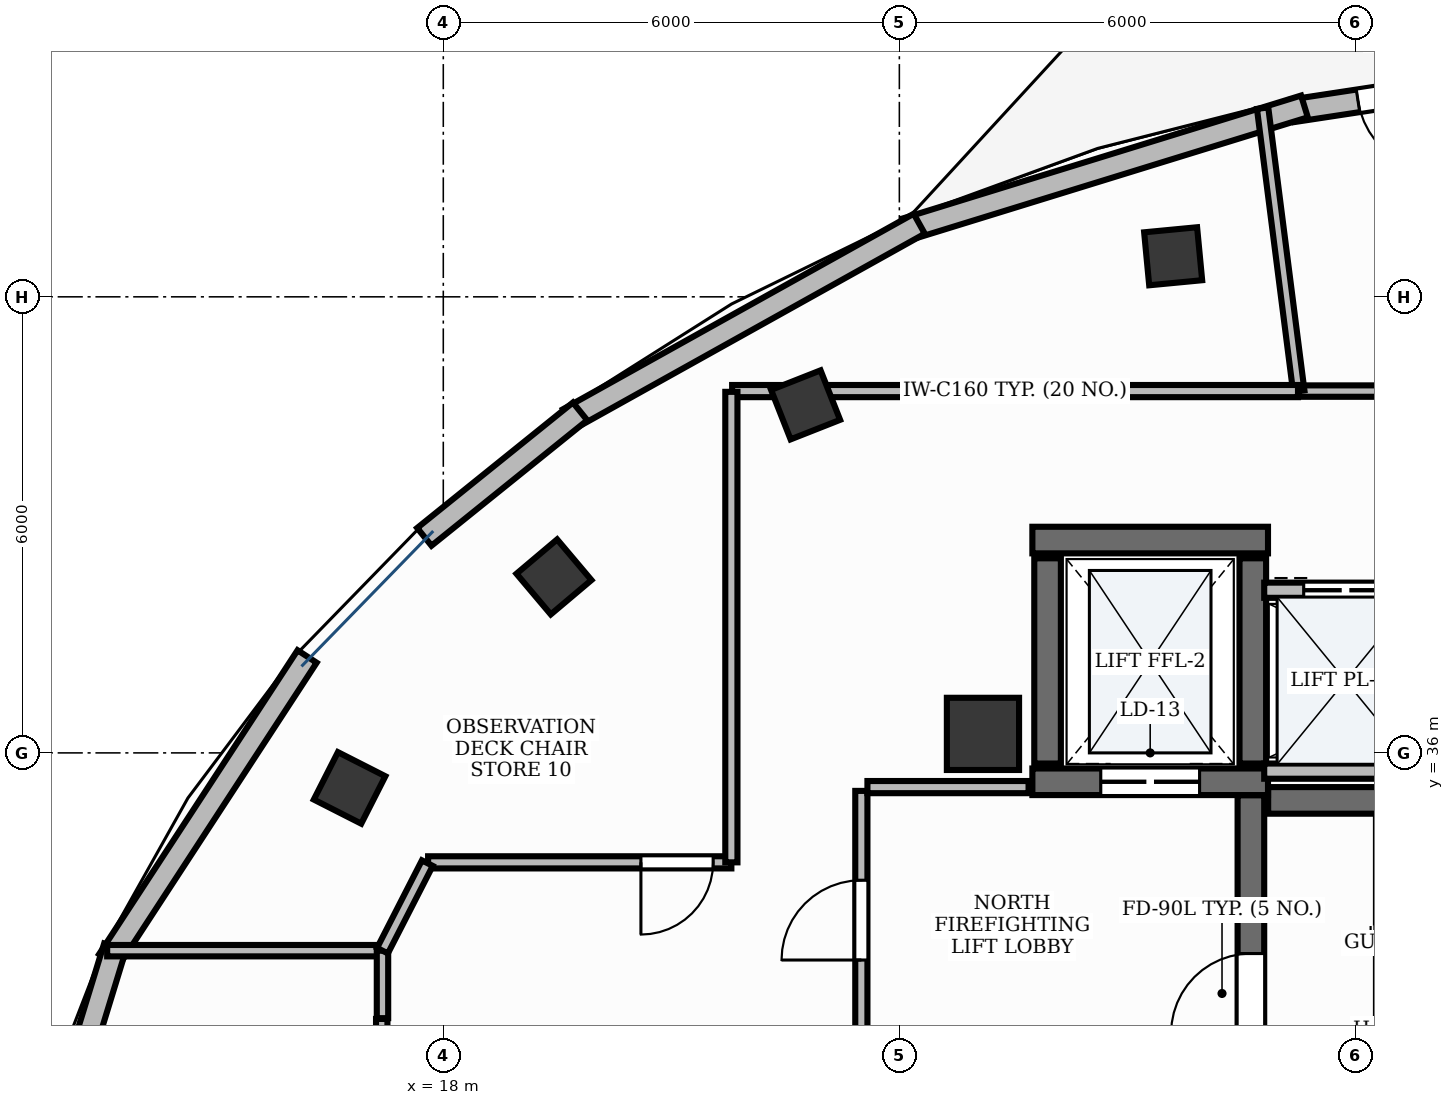
"""IFC4 building model, lengths in metres.
Left out: names, types, materials, properties, quantities, classifications, styles, units other than length and angle.
Written with IfcOpenShell. Run it as: python <this file> out.ifc"""

import sys

from ifc_helpers import new_model, si_unit, direction, frame, frame_2d, origin, origin_2d, place, context, subcontext, project, spatial, rectangle, extrude, element, fill, save


model = new_model("IFC4")
c1 = context("Model", 3, precision=1e-05, world=origin(), true_north=direction((0.0, 1.0)))
c2 = subcontext(c1, "Body", "Model", "MODEL_VIEW")
j1 = project(units=[si_unit("LENGTHUNIT", "METRE"), si_unit("PLANEANGLEUNIT", "RADIAN")], contexts=[c1])
p1 = place(None, origin())
s1 = spatial("IfcSite", under=j1, at=p1, CompositionType="ELEMENT")
p2 = place(p1, origin())
s2 = spatial("IfcBuilding", under=s1, at=p2, CompositionType="ELEMENT")
p3 = place(p2, frame((0.0, 0.0, 314.4)))
s3 = spatial("IfcBuildingStorey", under=s2, at=p3, CompositionType="ELEMENT", Elevation=314.4)
p4 = place(p3, frame((28.852, 35.375, 0.0), z_axis=(0.0, 0.0, 1.0), x_axis=(1.0, 0.0, 0.0)))
e1 = element("IfcWall", 1, at=p4, inside=s3, PredefinedType="SHEAR", context=c2, shape_type="SweptSolid", body=[
    extrude(rectangle(XDim=8.148, YDim=0.35, at=frame_2d((4.074, 0.0))), origin(), (0.0, 0.0, 1.0), 3.9),
])
p5 = place(p3, frame((28.625, 32.11, 0.0), z_axis=(0.0, 0.0, 1.0), x_axis=(0.0, 1.0, 0.0)))
e2 = element("IfcWall", 2, at=p5, inside=s3, PredefinedType="SHEAR", context=c2, shape_type="SweptSolid", body=[
    extrude(rectangle(XDim=3.333, YDim=0.35, at=frame_2d((1.667, 0.0))), origin(), (0.0, 0.0, 1.0), 3.9),
])
p6 = place(p5, frame((0.2, 0.0, 0.0)))
e3 = element("IfcOpeningElement", 3, at=p6, cuts=e2, PredefinedType="OPENING", context=c2, shape_type="SweptSolid", body=[
    extrude(rectangle(XDim=1.05, YDim=2.15, at=frame_2d((0.525, 1.075))), frame((0.0, 0.19, 0.0), z_axis=(0.0, -1.0, 0.0), x_axis=(1.0, 0.0, 0.0)), (0.0, 0.0, 1.0), 0.38),
])
p7 = place(p3, frame((25.75, 38.8, 0.0), z_axis=(0.0, 0.0, 1.0), x_axis=(1.0, 0.0, 0.0)))
e4 = element("IfcWall", 4, at=p7, inside=s3, PredefinedType="SHEAR", context=c2, shape_type="SweptSolid", body=[
    extrude(rectangle(XDim=3.1, YDim=0.35, at=frame_2d((1.55, 0.0))), origin(), (0.0, 0.0, 1.0), 3.9),
])
p8 = place(p3, frame((25.75, 35.62, 0.0), z_axis=(0.0, 0.0, 1.0), x_axis=(1.0, 0.0, 0.0)))
e5 = element("IfcWall", 5, at=p8, inside=s3, PredefinedType="SHEAR", context=c2, shape_type="SweptSolid", body=[
    extrude(rectangle(XDim=3.1, YDim=0.35, at=frame_2d((1.55, 0.0))), origin(), (0.0, 0.0, 1.0), 3.9),
])
p9 = place(p8, frame((0.9, 0.0, 0.0)))
e6 = element("IfcOpeningElement", 6, at=p9, cuts=e5, PredefinedType="OPENING", context=c2, shape_type="SweptSolid", body=[
    extrude(rectangle(XDim=1.3, YDim=2.2, at=frame_2d((0.65, 1.1))), frame((0.0, 0.19, 0.0), z_axis=(0.0, -1.0, 0.0), x_axis=(1.0, 0.0, 0.0)), (0.0, 0.0, 1.0), 0.38),
])
for number, where, z_axis, x_axis in (
    (7, (25.95, 35.86, 0.0), (0.0, 0.0, 1.0), (0.0, 1.0, 0.0)),
    (8, (28.65, 35.86, 0.0), (0.0, 0.0, 1.0), (0.0, 1.0, 0.0)),
):
    element("IfcWall", number, at=place(p3, frame(where, z_axis=z_axis, x_axis=x_axis)), inside=s3, PredefinedType="SHEAR", context=c2, shape_type="SweptSolid", body=[
        extrude(rectangle(XDim=2.7, YDim=0.35, at=frame_2d((1.35, 0.0))), origin(), (0.0, 0.0, 1.0), 3.9),
    ])
p10 = place(p3, frame((25.1, 36.25, -0.0), z_axis=(0.0, 0.0, 1.0), x_axis=(1.0, 0.0, 0.0)))
e9 = element("IfcColumn", 9, at=p10, inside=s3, PredefinedType="PILASTER", context=c2, shape_type="SweptSolid", body=[
    extrude(rectangle(XDim=0.95, YDim=0.95, at=origin_2d()), origin(), (0.0, 0.0, 1.0), 3.901),
])
for number, where, z_axis, x_axis in (
    (10, (27.602, 42.534, -0.0), (0.0, 0.0, 1.0), (0.995, 0.095, 0.0)),
    (11, (22.766, 40.579, -0.0), (0.0, 0.0, 1.0), (0.93, 0.367, 0.0)),
    (12, (19.456, 38.315, -0.0), (0.0, 0.0, 1.0), (0.764, 0.645, 0.0)),
    (13, (16.767, 35.54, -0.0), (0.0, 0.0, 1.0), (0.453, 0.891, 0.0)),
):
    element("IfcColumn", number, at=place(p3, frame(where, z_axis=z_axis, x_axis=x_axis)), inside=s3, PredefinedType="COLUMN", context=c2, shape_type="SweptSolid", body=[
        extrude(rectangle(XDim=0.7, YDim=0.7, at=origin_2d()), origin(), (0.0, 0.0, 1.0), 3.901),
    ])
p11 = place(p3, frame((31.979, 44.874, 0.0), z_axis=(0.0, 0.0, 1.0), x_axis=(-0.988616331056, -0.150458465925, 0.0)))
e14 = element("IfcWall", 14, at=p11, inside=s3, PredefinedType="STANDARD", context=c2, shape_type="SweptSolid", body=[
    extrude(rectangle(XDim=2.835, YDim=0.3, at=frame_2d((1.417, 0.0))), origin(), (0.0, 0.0, 1.0), 3.9),
])
p12 = place(p11, frame((0.867, 0.0, 0.0)))
e15 = element("IfcOpeningElement", 15, at=p12, cuts=e14, PredefinedType="OPENING", context=c2, shape_type="SweptSolid", body=[
    extrude(rectangle(XDim=1.1, YDim=2.15, at=frame_2d((0.55, 1.075))), frame((0.0, 0.165, 0.0), z_axis=(0.0, -1.0, 0.0), x_axis=(1.0, 0.0, 0.0)), (0.0, 0.0, 1.0), 0.33),
])
p13 = place(p3, frame((29.33, 44.505, 0.0), z_axis=(0.0, 0.0, 1.0), x_axis=(-0.955535200816, -0.29487705913, 0.0)))
e16 = element("IfcWall", 16, at=p13, inside=s3, PredefinedType="STANDARD", context=c2, shape_type="SweptSolid", body=[
    extrude(rectangle(XDim=5.485, YDim=0.3, at=frame_2d((2.743, 0.0))), origin(), (0.0, 0.0, 1.0), 3.9),
])
p14 = place(p3, frame((24.262, 42.962, 0.0), z_axis=(0.0, 0.0, 1.0), x_axis=(-0.87350676692, -0.486812004932, 0.0)))
e17 = element("IfcWall", 17, at=p14, inside=s3, PredefinedType="STANDARD", context=c2, shape_type="SweptSolid", body=[
    extrude(rectangle(XDim=5.282, YDim=0.3, at=frame_2d((2.641, 0.0))), origin(), (0.0, 0.0, 1.0), 3.9),
])
p15 = place(p3, frame((19.8, 40.493, 0.0), z_axis=(0.0, 0.0, 1.0), x_axis=(-0.778800498168, -0.627271698751, 0.0)))
e18 = element("IfcWall", 18, at=p15, inside=s3, PredefinedType="STANDARD", context=c2, shape_type="SweptSolid", body=[
    extrude(rectangle(XDim=2.631, YDim=0.3, at=frame_2d((1.315, 0.0))), origin(), (0.0, 0.0, 1.0), 3.9),
])
p16 = place(p3, frame((16.208, 37.269, 0.0), z_axis=(0.0, 0.0, 1.0), x_axis=(-0.546723072071, -0.837313491152, 0.0)))
e19 = element("IfcWall", 19, at=p16, inside=s3, PredefinedType="STANDARD", context=c2, shape_type="SweptSolid", body=[
    extrude(rectangle(XDim=4.775, YDim=0.3, at=frame_2d((2.388, 0.0))), origin(), (0.0, 0.0, 1.0), 3.9),
])
p17 = place(p3, frame((13.681, 33.449, 0.0), z_axis=(0.0, 0.0, 1.0), x_axis=(-0.293311854667, -0.956016817797, 0.0)))
e20 = element("IfcWall", 20, at=p17, inside=s3, PredefinedType="STANDARD", context=c2, shape_type="SweptSolid", body=[
    extrude(rectangle(XDim=4.589, YDim=0.3, at=frame_2d((2.294, 0.0))), origin(), (0.0, 0.0, 1.0), 3.9),
])
p18 = place(p3, frame((28.8, 35.76, 0.0), z_axis=(0.0, 0.0, 1.0), x_axis=(1.0, 0.0, 0.0)))
e21 = element("IfcWall", 21, at=p18, inside=s3, PredefinedType="PARTITIONING", context=c2, shape_type="SweptSolid", body=[
    extrude(rectangle(XDim=4.57, YDim=0.2, at=frame_2d((2.285, 0.0))), origin(), (0.0, 0.0, 1.0), 2.22),
])
p19 = place(p3, frame((28.8, 38.14, 0.0), z_axis=(0.0, 0.0, 1.0), x_axis=(1.0, 0.0, 0.0)))
e22 = element("IfcWall", 22, at=p19, inside=s3, PredefinedType="PARTITIONING", context=c2, shape_type="SweptSolid", body=[
    extrude(rectangle(XDim=4.57, YDim=0.2, at=frame_2d((2.285, 0.0))), origin(), (0.0, 0.0, 1.0), 2.22),
])
p20 = place(p19, frame((0.52, 0.0, 0.0)))
e23 = element("IfcOpeningElement", 23, at=p20, cuts=e22, PredefinedType="OPENING", context=c2, shape_type="SweptSolid", body=[
    extrude(rectangle(XDim=1.1, YDim=2.2, at=frame_2d((0.55, 1.1))), frame((0.0, 0.115, 0.0), z_axis=(0.0, -1.0, 0.0), x_axis=(1.0, 0.0, 0.0)), (0.0, 0.0, 1.0), 0.23),
])
p21 = place(p19, frame((2.92, 0.0, 0.0)))
e24 = element("IfcOpeningElement", 24, at=p21, cuts=e22, PredefinedType="OPENING", context=c2, shape_type="SweptSolid", body=[
    extrude(rectangle(XDim=1.1, YDim=2.2, at=frame_2d((0.55, 1.1))), frame((0.0, 0.115, 0.0), z_axis=(0.0, -1.0, 0.0), x_axis=(1.0, 0.0, 0.0)), (0.0, 0.0, 1.0), 0.23),
])
p22 = place(p3, frame((23.5, 32.1, 0.0), z_axis=(0.0, 0.0, 1.0), x_axis=(0.0, 1.0, 0.0)))
e25 = element("IfcWall", 25, at=p22, inside=s3, PredefinedType="PARTITIONING", context=c2, shape_type="SweptSolid", body=[
    extrude(rectangle(XDim=3.4, YDim=0.16, at=frame_2d((1.7, 0.0))), origin(), (0.0, 0.0, 1.0), 2.22),
])
p23 = place(p22, frame((1.175, 0.0, 0.0)))
e26 = element("IfcOpeningElement", 26, at=p23, cuts=e25, PredefinedType="OPENING", context=c2, shape_type="SweptSolid", body=[
    extrude(rectangle(XDim=1.05, YDim=2.15, at=frame_2d((0.525, 1.075))), frame((0.0, 0.095, 0.0), z_axis=(0.0, -1.0, 0.0), x_axis=(1.0, 0.0, 0.0)), (0.0, 0.0, 1.0), 0.19),
])
p24 = place(p3, frame((23.58, 35.55, 0.0), z_axis=(0.0, 0.0, 1.0), x_axis=(1.0, 0.0, 0.0)))
e27 = element("IfcWall", 27, at=p24, inside=s3, PredefinedType="PARTITIONING", context=c2, shape_type="SweptSolid", body=[
    extrude(rectangle(XDim=2.12, YDim=0.16, at=frame_2d((1.06, 0.0))), origin(), (0.0, 0.0, 1.0), 2.22),
])
p25 = place(p3, frame((34.642, 40.76, 0.0), z_axis=(0.0, 0.0, 1.0), x_axis=(-1.0, 0.0, 0.0)))
e28 = element("IfcWall", 28, at=p25, inside=s3, PredefinedType="PARTITIONING", context=c2, shape_type="SweptSolid", body=[
    extrude(rectangle(XDim=5.387, YDim=0.15, at=frame_2d((2.694, 0.0))), origin(), (0.0, 0.0, 1.0), 2.22),
])
p26 = place(p25, frame((0.24, 0.0, 0.0)))
e29 = element("IfcOpeningElement", 29, at=p26, cuts=e28, PredefinedType="OPENING", context=c2, shape_type="SweptSolid", body=[
    extrude(rectangle(XDim=0.95, YDim=2.15, at=frame_2d((0.475, 1.075))), frame((0.0, 0.09, 0.0), z_axis=(0.0, -1.0, 0.0), x_axis=(1.0, 0.0, 0.0)), (0.0, 0.0, 1.0), 0.18),
])
p27 = place(p3, frame((21.79, 34.56, 0.0), z_axis=(0.0, 0.0, 1.0), x_axis=(-1.0, 0.0, 0.0)))
e30 = element("IfcWall", 30, at=p27, inside=s3, PredefinedType="PARTITIONING", context=c2, shape_type="SweptSolid", body=[
    extrude(rectangle(XDim=3.99, YDim=0.16, at=frame_2d((1.995, 0.0))), origin(), (0.0, 0.0, 1.0), 2.22),
])
p28 = place(p27, frame((0.24, 0.0, 0.0)))
e31 = element("IfcOpeningElement", 31, at=p28, cuts=e30, PredefinedType="OPENING", context=c2, shape_type="SweptSolid", body=[
    extrude(rectangle(XDim=0.95, YDim=2.15, at=frame_2d((0.475, 1.075))), frame((0.0, 0.095, 0.0), z_axis=(0.0, -1.0, 0.0), x_axis=(1.0, 0.0, 0.0)), (0.0, 0.0, 1.0), 0.19),
])
p29 = place(p3, frame((13.578, 33.398, 0.0), z_axis=(0.0, 0.0, 1.0), x_axis=(1.0, 0.0, 0.0)))
e32 = element("IfcWall", 32, at=p29, inside=s3, PredefinedType="PARTITIONING", context=c2, shape_type="SweptSolid", body=[
    extrude(rectangle(XDim=3.622, YDim=0.15, at=frame_2d((1.811, 0.0))), origin(), (0.0, 0.0, 1.0), 2.22),
])
p30 = place(p3, frame((17.2, 33.398, 0.0), z_axis=(0.0, 0.0, 1.0), x_axis=(0.0, -1.0, 0.0)))
e33 = element("IfcWall", 33, at=p30, inside=s3, PredefinedType="PARTITIONING", context=c2, shape_type="SweptSolid", body=[
    extrude(rectangle(XDim=0.888, YDim=0.15, at=frame_2d((0.444, 0.0))), origin(), (0.0, 0.0, 1.0), 2.22),
])
p31 = place(p3, frame((17.19, 32.5, 0.0), z_axis=(0.0, 0.0, 1.0), x_axis=(0.0, -1.0, 0.0)))
e34 = element("IfcWall", 34, at=p31, inside=s3, PredefinedType="PARTITIONING", context=c2, shape_type="SweptSolid", body=[
    extrude(rectangle(XDim=2.7, YDim=0.15, at=frame_2d((1.35, 0.0))), origin(), (0.0, 0.0, 1.0), 2.22),
])
p32 = place(p3, frame((29.255, 40.76, 0.0), z_axis=(0.0, 0.0, 1.0), x_axis=(-0.126740854043, 0.991935862804, 0.0)))
e35 = element("IfcWall", 35, at=p32, inside=s3, PredefinedType="PARTITIONING", context=c2, shape_type="SweptSolid", body=[
    extrude(rectangle(XDim=3.752, YDim=0.15, at=frame_2d((1.876, 0.0))), origin(), (0.0, 0.0, 1.0), 2.22),
])
p33 = place(p3, frame((29.245, 40.76, 0.0), z_axis=(0.0, 0.0, 1.0), x_axis=(-1.0, 0.0, 0.0)))
e36 = element("IfcWall", 36, at=p33, inside=s3, PredefinedType="PARTITIONING", context=c2, shape_type="SweptSolid", body=[
    extrude(rectangle(XDim=7.445, YDim=0.16, at=frame_2d((3.722, 0.0))), origin(), (0.0, 0.0, 1.0), 2.22),
])
p34 = place(p3, frame((21.79, 40.75, 0.0), z_axis=(0.0, 0.0, 1.0), x_axis=(0.0, -1.0, 0.0)))
e37 = element("IfcWall", 37, at=p34, inside=s3, PredefinedType="PARTITIONING", context=c2, shape_type="SweptSolid", body=[
    extrude(rectangle(XDim=6.19, YDim=0.16, at=frame_2d((3.095, 0.0))), origin(), (0.0, 0.0, 1.0), 2.22),
])
p35 = place(p3, frame((17.79, 34.55, 0.0), z_axis=(0.0, 0.0, 1.0), x_axis=(-0.455868581402, -0.890047097906, 0.0)))
e38 = element("IfcWall", 38, at=p35, inside=s3, PredefinedType="PARTITIONING", context=c2, shape_type="SweptSolid", body=[
    extrude(rectangle(XDim=1.294, YDim=0.16, at=frame_2d((0.647, 0.0))), origin(), (0.0, 0.0, 1.0), 2.22),
])
p36 = place(p12, origin())
e39 = element("IfcDoor", 39, at=p36, inside=s3, OperationType="SINGLE_SWING_LEFT", PredefinedType="DOOR", context=c2, shape_type="SweptSolid", body=[
    extrude(rectangle(XDim=1.1, YDim=2.15, at=frame_2d((0.55, 1.075))), frame((0.0, 0.025, 0.0), z_axis=(0.0, -1.0, 0.0), x_axis=(1.0, 0.0, 0.0)), (0.0, 0.0, 1.0), 0.05),
])
fill(e15, e39)
p37 = place(p6, origin())
e40 = element("IfcDoor", 40, at=p37, inside=s3, OperationType="SINGLE_SWING_LEFT", PredefinedType="DOOR", context=c2, shape_type="SweptSolid", body=[
    extrude(rectangle(XDim=1.05, YDim=2.15, at=frame_2d((0.525, 1.075))), frame((0.0, 0.025, 0.0), z_axis=(0.0, -1.0, 0.0), x_axis=(1.0, 0.0, 0.0)), (0.0, 0.0, 1.0), 0.05),
])
fill(e3, e40)
p38 = place(p20, origin())
e41 = element("IfcDoor", 41, at=p38, inside=s3, OperationType="DOUBLE_DOOR_SLIDING", PredefinedType="DOOR", context=c2, shape_type="SweptSolid", body=[
    extrude(rectangle(XDim=1.1, YDim=2.2, at=frame_2d((0.55, 1.1))), frame((0.0, 0.025, 0.0), z_axis=(0.0, -1.0, 0.0), x_axis=(1.0, 0.0, 0.0)), (0.0, 0.0, 1.0), 0.05),
])
fill(e23, e41)
p39 = place(p9, origin())
e42 = element("IfcDoor", 42, at=p39, inside=s3, OperationType="DOUBLE_DOOR_SLIDING", PredefinedType="DOOR", context=c2, shape_type="SweptSolid", body=[
    extrude(rectangle(XDim=1.3, YDim=2.2, at=frame_2d((0.65, 1.1))), frame((0.0, 0.025, 0.0), z_axis=(0.0, -1.0, 0.0), x_axis=(1.0, 0.0, 0.0)), (0.0, 0.0, 1.0), 0.05),
])
fill(e6, e42)
p40 = place(p23, origin())
e43 = element("IfcDoor", 43, at=p40, inside=s3, OperationType="SINGLE_SWING_LEFT", PredefinedType="DOOR", context=c2, shape_type="SweptSolid", body=[
    extrude(rectangle(XDim=1.05, YDim=2.15, at=frame_2d((0.525, 1.075))), frame((0.0, 0.025, 0.0), z_axis=(0.0, -1.0, 0.0), x_axis=(1.0, 0.0, 0.0)), (0.0, 0.0, 1.0), 0.05),
])
fill(e26, e43)
p41 = place(p28, origin())
e44 = element("IfcDoor", 44, at=p41, inside=s3, OperationType="SINGLE_SWING_RIGHT", PredefinedType="DOOR", context=c2, shape_type="SweptSolid", body=[
    extrude(rectangle(XDim=0.95, YDim=2.15, at=frame_2d((0.475, 1.075))), frame((0.0, 0.025, 0.0), z_axis=(0.0, -1.0, 0.0), x_axis=(1.0, 0.0, 0.0)), (0.0, 0.0, 1.0), 0.05),
])
fill(e31, e44)
save(model, sys.argv[1])
